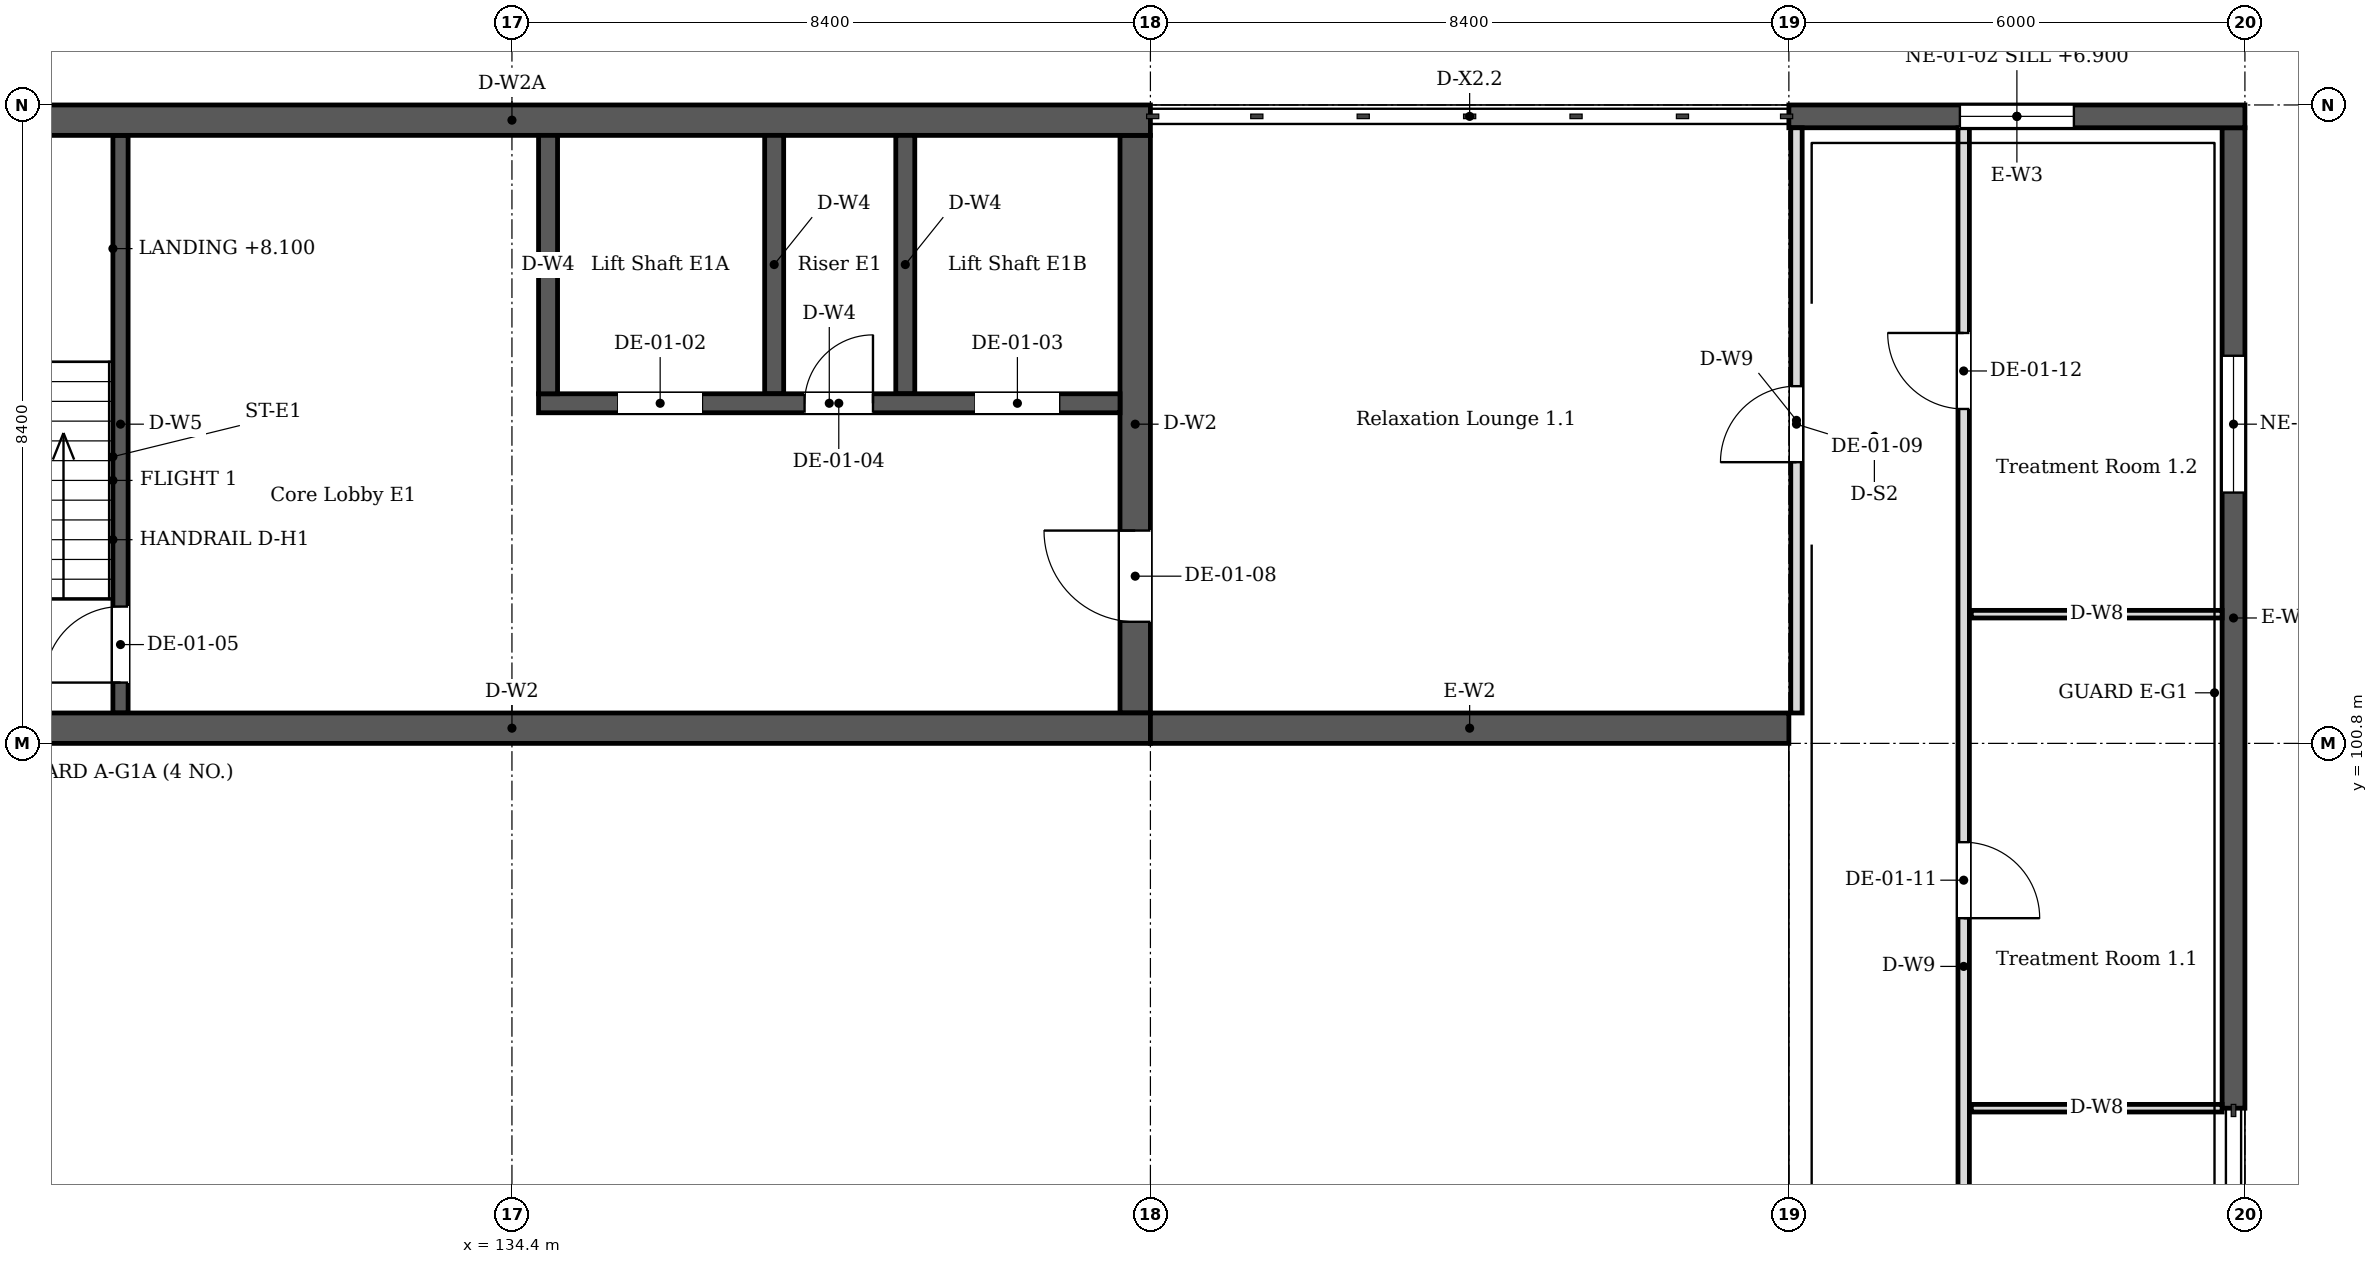
"""IFC4 building model, lengths in metres.
Left out: names, types, materials, properties, quantities, classifications, styles, units other than length and angle.
Written with IfcOpenShell. Run it as: python <this file> out.ifc"""

import sys

from ifc_helpers import new_model, si_unit, direction, frame, frame_2d, origin, place, context, subcontext, project, spatial, rectangle, extrude, element, fill, save


model = new_model("IFC4")
c1 = context("Model", 3, precision=1e-05, world=origin(), true_north=direction((0.0, 1.0)))
c2 = subcontext(c1, "Body", "Model", "MODEL_VIEW")
j1 = project(units=[si_unit("LENGTHUNIT", "METRE"), si_unit("PLANEANGLEUNIT", "RADIAN")], contexts=[c1])
p1 = place(None, origin())
s1 = spatial("IfcSite", under=j1, at=p1, CompositionType="ELEMENT")
p2 = place(p1, origin())
s2 = spatial("IfcBuilding", under=s1, at=p2, CompositionType="ELEMENT")
p3 = place(p2, frame((0.0, 0.0, 6.0)))
s3 = spatial("IfcBuildingStorey", under=s2, at=p3, CompositionType="ELEMENT", Elevation=6.0)
for number, where, z_axis, x_axis in (
    (1, (126.0, 101.0, 0.0), (0.0, 0.0, 1.0), (1.0, 0.0, 0.0)),
    (2, (126.0, 109.0, 0.0), (0.0, 0.0, 1.0), (1.0, 0.0, 0.0)),
):
    element("IfcWall", number, at=place(p3, frame(where, z_axis=z_axis, x_axis=x_axis)), inside=s3, PredefinedType="SOLIDWALL", context=c2, shape_type="SweptSolid", body=[
        extrude(rectangle(XDim=16.8, YDim=0.4, at=frame_2d((8.4, 0.0))), origin(), (0.0, 0.0, 1.0), 3.92),
    ])
p4 = place(p3, frame((142.6, 101.2, 0.0), z_axis=(0.0, 0.0, 1.0), x_axis=(0.0, 1.0, 0.0)))
e3 = element("IfcWall", 3, at=p4, inside=s3, PredefinedType="SOLIDWALL", context=c2, shape_type="SweptSolid", body=[
    extrude(rectangle(XDim=7.6, YDim=0.4, at=frame_2d((3.8, 0.0))), origin(), (0.0, 0.0, 1.0), 3.92),
])
p5 = place(p4, frame((1.2, 0.0, 0.0)))
e4 = element("IfcOpeningElement", 4, at=p5, cuts=e3, PredefinedType="OPENING", context=c2, shape_type="SweptSolid", body=[
    extrude(rectangle(XDim=1.2, YDim=2.1, at=frame_2d((0.6, 1.05))), frame((0.0, 0.21, 0.0), z_axis=(0.0, -1.0, 0.0), x_axis=(1.0, 0.0, 0.0)), (0.0, 0.0, 1.0), 0.42),
])
p6 = place(p3, frame((129.25, 101.2, 0.0), z_axis=(0.0, 0.0, 1.0), x_axis=(0.0, 1.0, 0.0)))
e5 = element("IfcWall", 5, at=p6, inside=s3, PredefinedType="SOLIDWALL", context=c2, shape_type="SweptSolid", body=[
    extrude(rectangle(XDim=7.6, YDim=0.2, at=frame_2d((3.8, 0.0))), origin(), (0.0, 0.0, 1.0), 3.92),
])
p7 = place(p6, frame((0.4, 0.0, 0.0)))
e6 = element("IfcOpeningElement", 6, at=p7, cuts=e5, PredefinedType="OPENING", context=c2, shape_type="SweptSolid", body=[
    extrude(rectangle(XDim=1.0, YDim=2.1, at=frame_2d((0.5, 1.05))), frame((0.0, 0.11, 0.0), z_axis=(0.0, -1.0, 0.0), x_axis=(1.0, 0.0, 0.0)), (0.0, 0.0, 1.0), 0.22),
])
p8 = place(p3, frame((142.8, 101.0, 0.0), z_axis=(0.0, 0.0, 1.0), x_axis=(1.0, 0.0, 0.0)))
e7 = element("IfcWall", 7, at=p8, inside=s3, PredefinedType="SOLIDWALL", context=c2, shape_type="SweptSolid", body=[
    extrude(rectangle(XDim=8.4, YDim=0.4, at=frame_2d((4.2, 0.0))), origin(), (0.0, 0.0, 1.0), 3.92),
])
p9 = place(p3, frame((134.75, 105.275, 0.0), z_axis=(0.0, 0.0, 1.0), x_axis=(1.0, 0.0, 0.0)))
e8 = element("IfcWall", 8, at=p9, inside=s3, PredefinedType="SOLIDWALL", context=c2, shape_type="SweptSolid", body=[
    extrude(rectangle(XDim=7.65, YDim=0.25, at=frame_2d((3.825, 0.0))), origin(), (0.0, 0.0, 1.0), 3.92),
])
p10 = place(p9, frame((1.05, 0.0, 0.0)))
e9 = element("IfcOpeningElement", 9, at=p10, cuts=e8, PredefinedType="OPENING", context=c2, shape_type="SweptSolid", body=[
    extrude(rectangle(XDim=1.1, YDim=2.1, at=frame_2d((0.55, 1.05))), frame((0.0, 0.135, 0.0), z_axis=(0.0, -1.0, 0.0), x_axis=(1.0, 0.0, 0.0)), (0.0, 0.0, 1.0), 0.27),
])
p11 = place(p9, frame((5.75, 0.0, 0.0)))
e10 = element("IfcOpeningElement", 10, at=p11, cuts=e8, PredefinedType="OPENING", context=c2, shape_type="SweptSolid", body=[
    extrude(rectangle(XDim=1.1, YDim=2.1, at=frame_2d((0.55, 1.05))), frame((0.0, 0.135, 0.0), z_axis=(0.0, -1.0, 0.0), x_axis=(1.0, 0.0, 0.0)), (0.0, 0.0, 1.0), 0.27),
])
p12 = place(p9, frame((3.5, 0.0, 0.0)))
e11 = element("IfcOpeningElement", 11, at=p12, cuts=e8, PredefinedType="OPENING", context=c2, shape_type="SweptSolid", body=[
    extrude(rectangle(XDim=0.9, YDim=2.1, at=frame_2d((0.45, 1.05))), frame((0.0, 0.135, 0.0), z_axis=(0.0, -1.0, 0.0), x_axis=(1.0, 0.0, 0.0)), (0.0, 0.0, 1.0), 0.27),
])
for number, where, z_axis, x_axis in (
    (12, (134.875, 105.4, 0.0), (0.0, 0.0, 1.0), (0.0, 1.0, 0.0)),
    (13, (137.85, 105.4, 0.0), (0.0, 0.0, 1.0), (0.0, 1.0, 0.0)),
    (14, (139.575, 105.4, 0.0), (0.0, 0.0, 1.0), (0.0, 1.0, 0.0)),
):
    element("IfcWall", number, at=place(p3, frame(where, z_axis=z_axis, x_axis=x_axis)), inside=s3, PredefinedType="SOLIDWALL", context=c2, shape_type="SweptSolid", body=[
        extrude(rectangle(XDim=3.4, YDim=0.25, at=frame_2d((1.7, 0.0))), origin(), (0.0, 0.0, 1.0), 3.92),
    ])
p13 = place(p3, frame((157.05, 96.0, 0.0), z_axis=(0.0, 0.0, 1.0), x_axis=(0.0, 1.0, 0.0)))
e15 = element("IfcWall", 15, at=p13, inside=s3, PredefinedType="SOLIDWALL", context=c2, shape_type="SweptSolid", body=[
    extrude(rectangle(XDim=12.9, YDim=0.3, at=frame_2d((6.45, 0.0))), origin(), (0.0, 0.0, 1.0), 3.92),
])
p14 = place(p13, frame((8.1, 0.0, 0.9)))
e16 = element("IfcOpeningElement", 16, at=p14, cuts=e15, PredefinedType="OPENING", context=c2, shape_type="SweptSolid", body=[
    extrude(rectangle(XDim=1.8, YDim=1.2, at=frame_2d((0.9, 0.6))), frame((0.0, 0.16, 0.0), z_axis=(0.0, -1.0, 0.0), x_axis=(1.0, 0.0, 0.0)), (0.0, 0.0, 1.0), 0.32),
])
p15 = place(p3, frame((151.2, 109.05, 0.0), z_axis=(0.0, 0.0, 1.0), x_axis=(1.0, 0.0, 0.0)))
e17 = element("IfcWall", 17, at=p15, inside=s3, PredefinedType="SOLIDWALL", context=c2, shape_type="SweptSolid", body=[
    extrude(rectangle(XDim=6.0, YDim=0.3, at=frame_2d((3.0, 0.0))), origin(), (0.0, 0.0, 1.0), 3.92),
])
p16 = place(p15, frame((2.25, 0.0, 0.9)))
e18 = element("IfcOpeningElement", 18, at=p16, cuts=e17, PredefinedType="OPENING", context=c2, shape_type="SweptSolid", body=[
    extrude(rectangle(XDim=1.5, YDim=1.2, at=frame_2d((0.75, 0.6))), frame((0.0, 0.16, 0.0), z_axis=(0.0, -1.0, 0.0), x_axis=(1.0, 0.0, 0.0)), (0.0, 0.0, 1.0), 0.32),
])
p17 = place(p3, frame((153.5, 84.2, 0.0), z_axis=(0.0, 0.0, 1.0), x_axis=(0.0, 1.0, 0.0)))
e19 = element("IfcWall", 19, at=p17, inside=s3, PredefinedType="PARTITIONING", context=c2, shape_type="SweptSolid", body=[
    extrude(rectangle(XDim=24.7, YDim=0.15, at=frame_2d((12.35, 0.0))), origin(), (0.0, 0.0, 1.0), 3.92),
])
p18 = place(p17, frame((5.25, 0.0, 0.0)))
e20 = element("IfcOpeningElement", 20, at=p18, cuts=e19, PredefinedType="OPENING", context=c2, shape_type="SweptSolid", body=[
    extrude(rectangle(XDim=1.1, YDim=2.4, at=frame_2d((0.55, 1.2))), frame((0.0, 0.085, 0.0), z_axis=(0.0, -1.0, 0.0), x_axis=(1.0, 0.0, 0.0)), (0.0, 0.0, 1.0), 0.17),
])
p19 = place(p17, frame((14.3, 0.0, 0.0)))
e21 = element("IfcOpeningElement", 21, at=p19, cuts=e19, PredefinedType="OPENING", context=c2, shape_type="SweptSolid", body=[
    extrude(rectangle(XDim=1.0, YDim=2.1, at=frame_2d((0.5, 1.05))), frame((0.0, 0.085, 0.0), z_axis=(0.0, -1.0, 0.0), x_axis=(1.0, 0.0, 0.0)), (0.0, 0.0, 1.0), 0.17),
])
p20 = place(p17, frame((21.0, 0.0, 0.0)))
e22 = element("IfcOpeningElement", 22, at=p20, cuts=e19, PredefinedType="OPENING", context=c2, shape_type="SweptSolid", body=[
    extrude(rectangle(XDim=1.0, YDim=2.1, at=frame_2d((0.5, 1.05))), frame((0.0, 0.085, 0.0), z_axis=(0.0, -1.0, 0.0), x_axis=(1.0, 0.0, 0.0)), (0.0, 0.0, 1.0), 0.17),
])
p21 = place(p3, frame((151.3, 101.2, 0.0), z_axis=(0.0, 0.0, 1.0), x_axis=(0.0, 1.0, 0.0)))
e23 = element("IfcWall", 23, at=p21, inside=s3, PredefinedType="PARTITIONING", context=c2, shape_type="SweptSolid", body=[
    extrude(rectangle(XDim=7.7, YDim=0.15, at=frame_2d((3.85, 0.0))), origin(), (0.0, 0.0, 1.0), 3.92),
])
p22 = place(p21, frame((3.3, 0.0, 0.0)))
e24 = element("IfcOpeningElement", 24, at=p22, cuts=e23, PredefinedType="OPENING", context=c2, shape_type="SweptSolid", body=[
    extrude(rectangle(XDim=1.0, YDim=2.1, at=frame_2d((0.5, 1.05))), frame((0.0, 0.085, 0.0), z_axis=(0.0, -1.0, 0.0), x_axis=(1.0, 0.0, 0.0)), (0.0, 0.0, 1.0), 0.17),
])
for number, where, z_axis, x_axis in (
    (25, (153.6, 96.0, 0.0), (0.0, 0.0, 1.0), (1.0, 0.0, 0.0)),
    (26, (153.6, 102.5, 0.0), (0.0, 0.0, 1.0), (1.0, 0.0, 0.0)),
):
    element("IfcWall", number, at=place(p3, frame(where, z_axis=z_axis, x_axis=x_axis)), inside=s3, PredefinedType="PARTITIONING", context=c2, shape_type="SweptSolid", body=[
        extrude(rectangle(XDim=3.3, YDim=0.1, at=frame_2d((1.65, 0.0))), origin(), (0.0, 0.0, 1.0), 3.92),
    ])
p23 = place(p14, origin())
e27 = element("IfcWindow", 27, at=p23, inside=s3, PartitioningType="SINGLE_PANEL", PredefinedType="WINDOW", context=c2, shape_type="SweptSolid", body=[
    extrude(rectangle(XDim=1.8, YDim=1.2, at=frame_2d((0.9, 0.6))), frame((0.0, 0.03, 0.0), z_axis=(0.0, -1.0, 0.0), x_axis=(1.0, 0.0, 0.0)), (0.0, 0.0, 1.0), 0.06),
])
fill(e16, e27)
p24 = place(p16, origin())
e28 = element("IfcWindow", 28, at=p24, inside=s3, PartitioningType="SINGLE_PANEL", PredefinedType="WINDOW", context=c2, shape_type="SweptSolid", body=[
    extrude(rectangle(XDim=1.5, YDim=1.2, at=frame_2d((0.75, 0.6))), frame((0.0, 0.03, 0.0), z_axis=(0.0, -1.0, 0.0), x_axis=(1.0, 0.0, 0.0)), (0.0, 0.0, 1.0), 0.06),
])
fill(e18, e28)
p25 = place(p10, origin())
e29 = element("IfcDoor", 29, at=p25, inside=s3, OperationType="DOUBLE_DOOR_SLIDING", PredefinedType="DOOR", context=c2, shape_type="SweptSolid", body=[
    extrude(rectangle(XDim=1.1, YDim=2.1, at=frame_2d((0.55, 1.05))), frame((0.0, 0.025, 0.0), z_axis=(0.0, -1.0, 0.0), x_axis=(1.0, 0.0, 0.0)), (0.0, 0.0, 1.0), 0.05),
])
fill(e9, e29)
p26 = place(p11, origin())
e30 = element("IfcDoor", 30, at=p26, inside=s3, OperationType="DOUBLE_DOOR_SLIDING", PredefinedType="DOOR", context=c2, shape_type="SweptSolid", body=[
    extrude(rectangle(XDim=1.1, YDim=2.1, at=frame_2d((0.55, 1.05))), frame((0.0, 0.025, 0.0), z_axis=(0.0, -1.0, 0.0), x_axis=(1.0, 0.0, 0.0)), (0.0, 0.0, 1.0), 0.05),
])
fill(e10, e30)
p27 = place(p12, origin())
e31 = element("IfcDoor", 31, at=p27, inside=s3, OperationType="SINGLE_SWING_LEFT", PredefinedType="DOOR", context=c2, shape_type="SweptSolid", body=[
    extrude(rectangle(XDim=0.9, YDim=2.1, at=frame_2d((0.45, 1.05))), frame((0.0, 0.025, 0.0), z_axis=(0.0, -1.0, 0.0), x_axis=(1.0, 0.0, 0.0)), (0.0, 0.0, 1.0), 0.05),
])
fill(e11, e31)
p28 = place(p7, origin())
e32 = element("IfcDoor", 32, at=p28, inside=s3, OperationType="SINGLE_SWING_LEFT", PredefinedType="DOOR", context=c2, shape_type="SweptSolid", body=[
    extrude(rectangle(XDim=1.0, YDim=2.1, at=frame_2d((0.5, 1.05))), frame((0.0, 0.025, 0.0), z_axis=(0.0, -1.0, 0.0), x_axis=(1.0, 0.0, 0.0)), (0.0, 0.0, 1.0), 0.05),
])
fill(e6, e32)
p29 = place(p5, origin())
e33 = element("IfcDoor", 33, at=p29, inside=s3, OperationType="SINGLE_SWING_LEFT", PredefinedType="DOOR", context=c2, shape_type="SweptSolid", body=[
    extrude(rectangle(XDim=1.2, YDim=2.1, at=frame_2d((0.6, 1.05))), frame((0.0, 0.025, 0.0), z_axis=(0.0, -1.0, 0.0), x_axis=(1.0, 0.0, 0.0)), (0.0, 0.0, 1.0), 0.05),
])
fill(e4, e33)
p30 = place(p22, origin())
e34 = element("IfcDoor", 34, at=p30, inside=s3, OperationType="SINGLE_SWING_LEFT", PredefinedType="DOOR", context=c2, shape_type="SweptSolid", body=[
    extrude(rectangle(XDim=1.0, YDim=2.1, at=frame_2d((0.5, 1.05))), frame((0.0, 0.025, 0.0), z_axis=(0.0, -1.0, 0.0), x_axis=(1.0, 0.0, 0.0)), (0.0, 0.0, 1.0), 0.05),
])
fill(e24, e34)
p31 = place(p19, origin())
e35 = element("IfcDoor", 35, at=p31, inside=s3, OperationType="SINGLE_SWING_LEFT", PredefinedType="DOOR", context=c2, shape_type="SweptSolid", body=[
    extrude(rectangle(XDim=1.0, YDim=2.1, at=frame_2d((0.5, 1.05))), frame((0.0, 0.025, 0.0), z_axis=(0.0, -1.0, 0.0), x_axis=(1.0, 0.0, 0.0)), (0.0, 0.0, 1.0), 0.05),
])
fill(e21, e35)
p32 = place(p20, origin())
e36 = element("IfcDoor", 36, at=p32, inside=s3, OperationType="SINGLE_SWING_LEFT", PredefinedType="DOOR", context=c2, shape_type="SweptSolid", body=[
    extrude(rectangle(XDim=1.0, YDim=2.1, at=frame_2d((0.5, 1.05))), frame((0.0, 0.025, 0.0), z_axis=(0.0, -1.0, 0.0), x_axis=(1.0, 0.0, 0.0)), (0.0, 0.0, 1.0), 0.05),
])
fill(e22, e36)
save(model, sys.argv[1])
